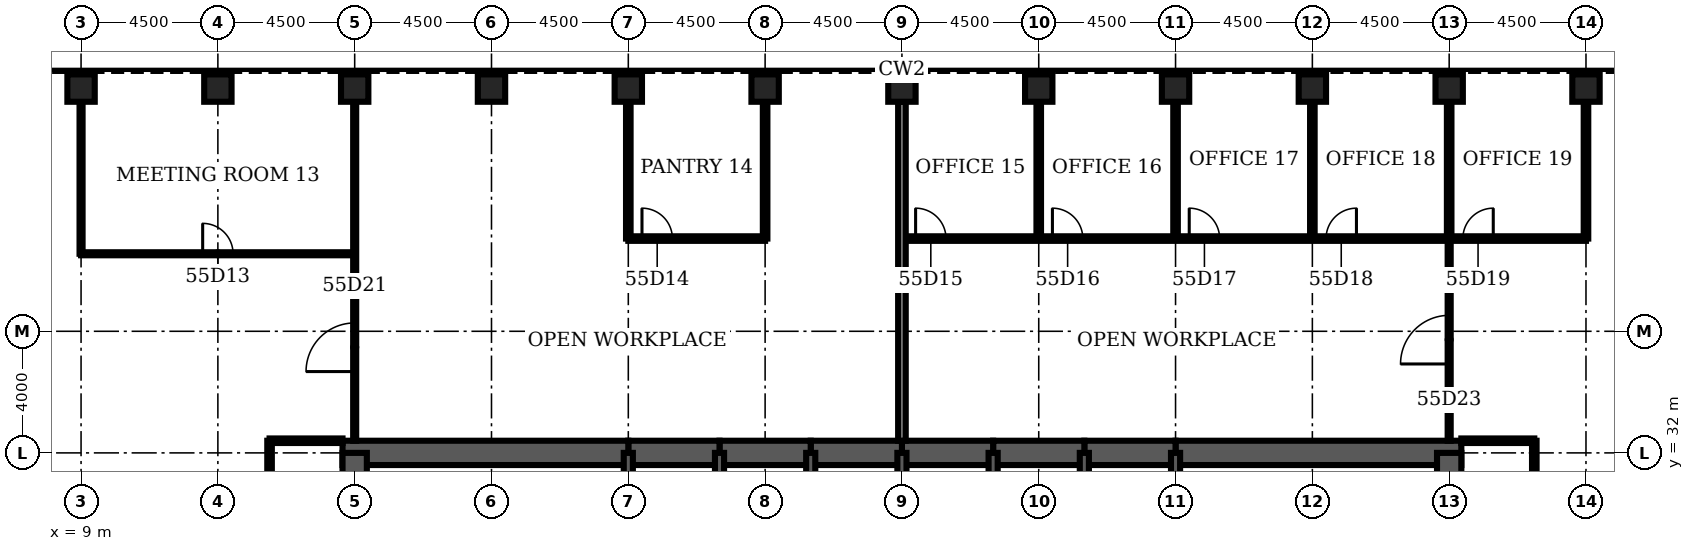
"""IFC4 building model, lengths in metres.
Left out: names, types, materials, properties, quantities, classifications, styles, units other than length and angle.
Written with IfcOpenShell. Run it as: python <this file> out.ifc"""

import sys

from ifc_helpers import new_model, si_unit, direction, frame, frame_2d, origin, origin_2d, place, context, subcontext, project, spatial, rectangle, hollow_rectangle, extrude, element, fill, save


model = new_model("IFC4")
c1 = context("Model", 3, precision=1e-05, world=origin(), true_north=direction((0.0, 1.0)))
c2 = subcontext(c1, "Body", "Model", "MODEL_VIEW")
j1 = project(units=[si_unit("LENGTHUNIT", "METRE"), si_unit("PLANEANGLEUNIT", "RADIAN")], contexts=[c1])
p1 = place(None, origin())
s1 = spatial("IfcSite", under=j1, at=p1, CompositionType="ELEMENT")
p2 = place(p1, origin())
s2 = spatial("IfcBuilding", under=s1, at=p2, CompositionType="ELEMENT")
p3 = place(p2, frame((0.0, 0.0, 244.6)))
s3 = spatial("IfcBuildingStorey", under=s2, at=p3, CompositionType="ELEMENT", Elevation=244.6)
for number, where, z_axis, x_axis in (
    (1, (58.5, 44.0, 0.0), (0.0, 0.0, 1.0), (0.0, 1.0, 0.0)),
    (2, (54.0, 44.0, 0.0), (0.0, 0.0, 1.0), (0.0, 1.0, 0.0)),
    (3, (49.5, 44.0, 0.0), (0.0, 0.0, 1.0), (0.0, 1.0, 0.0)),
    (4, (45.0, 44.0, 0.0), (0.0, 0.0, 1.0), (0.0, 1.0, 0.0)),
    (5, (40.5, 44.0, 0.0), (0.0, 0.0, 1.0), (0.0, 1.0, 0.0)),
    (6, (36.0, 44.0, 0.0), (0.0, 0.0, 1.0), (0.0, 1.0, 0.0)),
    (7, (31.5, 44.0, 0.0), (0.0, 0.0, 1.0), (0.0, 1.0, 0.0)),
    (8, (27.0, 44.0, 0.0), (0.0, 0.0, 1.0), (0.0, 1.0, 0.0)),
    (9, (22.5, 44.0, 0.0), (0.0, 0.0, 1.0), (0.0, 1.0, 0.0)),
    (10, (18.0, 44.0, 0.0), (0.0, 0.0, 1.0), (0.0, 1.0, 0.0)),
    (11, (13.5, 44.0, 0.0), (0.0, 0.0, 1.0), (0.0, 1.0, 0.0)),
    (12, (9.0, 44.0, 0.0), (0.0, 0.0, 1.0), (0.0, 1.0, 0.0)),
):
    element("IfcColumn", number, at=place(p3, frame(where, z_axis=z_axis, x_axis=x_axis)), inside=s3, PredefinedType="COLUMN", context=c2, shape_type="SweptSolid", body=[
        extrude(hollow_rectangle(XDim=0.9, YDim=0.9, WallThickness=0.08, at=origin_2d()), origin(), (0.0, 0.0, 1.0), 4.2),
    ])
p4 = place(p3, frame((54.4, 32.0, 0.0), z_axis=(0.0, 0.0, 1.0), x_axis=(-1.0, 0.0, 0.0)))
e13 = element("IfcWall", 13, at=p4, inside=s3, PredefinedType="SHEAR", context=c2, shape_type="SweptSolid", body=[
    extrude(rectangle(XDim=9.4, YDim=0.8, at=frame_2d((4.7, 0.0))), origin(), (0.0, 0.0, 1.0), 4.2),
])
for number, where, z_axis, x_axis in (
    (14, (45.0, 32.0, 0.0), (0.0, 0.0, 1.0), (-1.0, 0.0, 0.0)),
    (15, (42.0, 32.0, 0.0), (0.0, 0.0, 1.0), (-1.0, 0.0, 0.0)),
    (16, (39.0, 32.0, 0.0), (0.0, 0.0, 1.0), (-1.0, 0.0, 0.0)),
    (17, (36.0, 32.0, 0.0), (0.0, 0.0, 1.0), (-1.0, 0.0, 0.0)),
    (18, (33.0, 32.0, 0.0), (0.0, 0.0, 1.0), (-1.0, 0.0, 0.0)),
    (19, (30.0, 32.0, 0.0), (0.0, 0.0, 1.0), (-1.0, 0.0, 0.0)),
):
    element("IfcWall", number, at=place(p3, frame(where, z_axis=z_axis, x_axis=x_axis)), inside=s3, PredefinedType="SHEAR", context=c2, shape_type="SweptSolid", body=[
        extrude(rectangle(XDim=3.0, YDim=0.8, at=frame_2d((1.5, 0.0))), origin(), (0.0, 0.0, 1.0), 4.2),
    ])
p5 = place(p3, frame((27.0, 32.0, 0.0), z_axis=(0.0, 0.0, 1.0), x_axis=(-1.0, 0.0, 0.0)))
e20 = element("IfcWall", 20, at=p5, inside=s3, PredefinedType="SHEAR", context=c2, shape_type="SweptSolid", body=[
    extrude(rectangle(XDim=9.4, YDim=0.8, at=frame_2d((4.7, 0.0))), origin(), (0.0, 0.0, 1.0), 4.2),
])
for number, where, z_axis, x_axis in (
    (21, (18.0, 32.0, 0.0), (0.0, 0.0, 1.0), (0.0, -1.0, 0.0)),
    (22, (54.0, 28.8, 0.0), (0.0, 0.0, 1.0), (0.0, 1.0, 0.0)),
):
    element("IfcWall", number, at=place(p3, frame(where, z_axis=z_axis, x_axis=x_axis)), inside=s3, PredefinedType="SHEAR", context=c2, shape_type="SweptSolid", body=[
        extrude(rectangle(XDim=3.2, YDim=0.8, at=frame_2d((1.6, 0.0))), origin(), (0.0, 0.0, 1.0), 4.2),
    ])
for number, where, z_axis, x_axis in (
    (23, (27.0, 28.8, 0.0), (0.0, 0.0, 1.0), (0.0, 1.0, 0.0)),
    (24, (30.0, 28.8, 0.0), (0.0, 0.0, 1.0), (0.0, 1.0, 0.0)),
    (25, (33.0, 28.8, 0.0), (0.0, 0.0, 1.0), (0.0, 1.0, 0.0)),
    (26, (36.0, 28.8, 0.0), (0.0, 0.0, 1.0), (0.0, 1.0, 0.0)),
    (27, (39.0, 28.8, 0.0), (0.0, 0.0, 1.0), (0.0, 1.0, 0.0)),
    (28, (42.0, 28.8, 0.0), (0.0, 0.0, 1.0), (0.0, 1.0, 0.0)),
    (29, (45.0, 28.8, 0.0), (0.0, 0.0, 1.0), (0.0, 1.0, 0.0)),
):
    element("IfcWall", number, at=place(p3, frame(where, z_axis=z_axis, x_axis=x_axis)), inside=s3, PredefinedType="SOLIDWALL", context=c2, shape_type="SweptSolid", body=[
        extrude(rectangle(XDim=3.2, YDim=0.3, at=frame_2d((1.6, 0.0))), origin(), (0.0, 0.0, 1.0), 4.2),
    ])
for number, where, z_axis, x_axis in (
    (30, (15.2, 32.4, 0.0), (0.0, 0.0, 1.0), (1.0, 0.0, 0.0)),
    (31, (54.4, 32.4, 0.0), (0.0, 0.0, 1.0), (1.0, 0.0, 0.0)),
):
    element("IfcWall", number, at=place(p3, frame(where, z_axis=z_axis, x_axis=x_axis)), inside=s3, PredefinedType="PARTITIONING", context=c2, shape_type="SweptSolid", body=[
        extrude(rectangle(XDim=2.4, YDim=0.15, at=frame_2d((1.2, 0.0))), origin(), (0.0, 0.0, 1.0), 3.0),
    ])
p6 = place(p3, frame((9.0, 38.55, 0.0), z_axis=(0.0, 0.0, 1.0), x_axis=(1.0, 0.0, 0.0)))
e32 = element("IfcWall", 32, at=p6, inside=s3, PredefinedType="PARTITIONING", context=c2, shape_type="SweptSolid", body=[
    extrude(rectangle(XDim=9.0, YDim=0.1, at=frame_2d((4.5, 0.0))), origin(), (0.0, 0.0, 1.0), 3.0),
])
p7 = place(p6, frame((4.0, 0.0, 0.0)))
e33 = element("IfcOpeningElement", 33, at=p7, cuts=e32, PredefinedType="OPENING", context=c2, shape_type="SweptSolid", body=[
    extrude(rectangle(XDim=1.0, YDim=2.1, at=frame_2d((0.5, 1.05))), frame((0.0, 0.06, 0.0), z_axis=(0.0, -1.0, 0.0), x_axis=(1.0, 0.0, 0.0)), (0.0, 0.0, 1.0), 0.12),
])
p8 = place(p3, frame((27.0, 39.05, 0.0), z_axis=(0.0, 0.0, 1.0), x_axis=(1.0, 0.0, 0.0)))
e34 = element("IfcWall", 34, at=p8, inside=s3, PredefinedType="PARTITIONING", context=c2, shape_type="SweptSolid", body=[
    extrude(rectangle(XDim=4.5, YDim=0.15, at=frame_2d((2.25, 0.0))), origin(), (0.0, 0.0, 1.0), 3.0),
])
p9 = place(p8, frame((0.45, 0.0, 0.0)))
e35 = element("IfcOpeningElement", 35, at=p9, cuts=e34, PredefinedType="OPENING", context=c2, shape_type="SweptSolid", body=[
    extrude(rectangle(XDim=1.0, YDim=2.1, at=frame_2d((0.5, 1.05))), frame((0.0, 0.085, 0.0), z_axis=(0.0, -1.0, 0.0), x_axis=(1.0, 0.0, 0.0)), (0.0, 0.0, 1.0), 0.17),
])
p10 = place(p3, frame((36.0, 39.05, 0.0), z_axis=(0.0, 0.0, 1.0), x_axis=(1.0, 0.0, 0.0)))
e36 = element("IfcWall", 36, at=p10, inside=s3, PredefinedType="PARTITIONING", context=c2, shape_type="SweptSolid", body=[
    extrude(rectangle(XDim=22.5, YDim=0.15, at=frame_2d((11.25, 0.0))), origin(), (0.0, 0.0, 1.0), 3.0),
])
p11 = place(p10, frame((0.45, 0.0, 0.0)))
e37 = element("IfcOpeningElement", 37, at=p11, cuts=e36, PredefinedType="OPENING", context=c2, shape_type="SweptSolid", body=[
    extrude(rectangle(XDim=1.0, YDim=2.1, at=frame_2d((0.5, 1.05))), frame((0.0, 0.085, 0.0), z_axis=(0.0, -1.0, 0.0), x_axis=(1.0, 0.0, 0.0)), (0.0, 0.0, 1.0), 0.17),
])
p12 = place(p10, frame((4.95, 0.0, 0.0)))
e38 = element("IfcOpeningElement", 38, at=p12, cuts=e36, PredefinedType="OPENING", context=c2, shape_type="SweptSolid", body=[
    extrude(rectangle(XDim=1.0, YDim=2.1, at=frame_2d((0.5, 1.05))), frame((0.0, 0.085, 0.0), z_axis=(0.0, -1.0, 0.0), x_axis=(1.0, 0.0, 0.0)), (0.0, 0.0, 1.0), 0.17),
])
p13 = place(p10, frame((9.45, 0.0, 0.0)))
e39 = element("IfcOpeningElement", 39, at=p13, cuts=e36, PredefinedType="OPENING", context=c2, shape_type="SweptSolid", body=[
    extrude(rectangle(XDim=1.0, YDim=2.1, at=frame_2d((0.5, 1.05))), frame((0.0, 0.085, 0.0), z_axis=(0.0, -1.0, 0.0), x_axis=(1.0, 0.0, 0.0)), (0.0, 0.0, 1.0), 0.17),
])
p14 = place(p10, frame((13.95, 0.0, 0.0)))
e40 = element("IfcOpeningElement", 40, at=p14, cuts=e36, PredefinedType="OPENING", context=c2, shape_type="SweptSolid", body=[
    extrude(rectangle(XDim=1.0, YDim=2.1, at=frame_2d((0.5, 1.05))), frame((0.0, 0.085, 0.0), z_axis=(0.0, -1.0, 0.0), x_axis=(1.0, 0.0, 0.0)), (0.0, 0.0, 1.0), 0.17),
])
p15 = place(p10, frame((18.45, 0.0, 0.0)))
e41 = element("IfcOpeningElement", 41, at=p15, cuts=e36, PredefinedType="OPENING", context=c2, shape_type="SweptSolid", body=[
    extrude(rectangle(XDim=1.0, YDim=2.1, at=frame_2d((0.5, 1.05))), frame((0.0, 0.085, 0.0), z_axis=(0.0, -1.0, 0.0), x_axis=(1.0, 0.0, 0.0)), (0.0, 0.0, 1.0), 0.17),
])
p16 = place(p3, frame((9.0, 38.55, 0.0), z_axis=(0.0, 0.0, 1.0), x_axis=(0.0, 1.0, 0.0)))
e42 = element("IfcWall", 42, at=p16, inside=s3, PredefinedType="PARTITIONING", context=c2, shape_type="SweptSolid", body=[
    extrude(rectangle(XDim=5.0, YDim=0.1, at=frame_2d((2.5, 0.0))), origin(), (0.0, 0.0, 1.0), 3.0),
])
p17 = place(p3, frame((15.2, 13.8, 0.0), z_axis=(0.0, 0.0, 1.0), x_axis=(0.0, 1.0, 0.0)))
e43 = element("IfcWall", 43, at=p17, inside=s3, PredefinedType="PARTITIONING", context=c2, shape_type="SweptSolid", body=[
    extrude(rectangle(XDim=18.6, YDim=0.15, at=frame_2d((9.3, 0.0))), origin(), (0.0, 0.0, 1.0), 3.0),
])
p18 = place(p17, frame((8.7, 0.0, 0.0)))
e44 = element("IfcOpeningElement", 44, at=p18, cuts=e43, PredefinedType="OPENING", context=c2, shape_type="SweptSolid", body=[
    extrude(rectangle(XDim=1.2, YDim=2.1, at=frame_2d((0.6, 1.05))), frame((0.0, 0.085, 0.0), z_axis=(0.0, -1.0, 0.0), x_axis=(1.0, 0.0, 0.0)), (0.0, 0.0, 1.0), 0.17),
])
p19 = place(p3, frame((18.0, 32.4, 0.0), z_axis=(0.0, 0.0, 1.0), x_axis=(0.0, 1.0, 0.0)))
e45 = element("IfcWall", 45, at=p19, inside=s3, PredefinedType="PARTITIONING", context=c2, shape_type="SweptSolid", body=[
    extrude(rectangle(XDim=11.15, YDim=0.1, at=frame_2d((5.575, 0.0))), origin(), (0.0, 0.0, 1.0), 3.0),
])
p20 = place(p19, frame((2.275, 0.0, 0.0)))
e46 = element("IfcOpeningElement", 46, at=p20, cuts=e45, PredefinedType="OPENING", context=c2, shape_type="SweptSolid", body=[
    extrude(rectangle(XDim=1.6, YDim=2.1, at=frame_2d((0.8, 1.05))), frame((0.0, 0.06, 0.0), z_axis=(0.0, -1.0, 0.0), x_axis=(1.0, 0.0, 0.0)), (0.0, 0.0, 1.0), 0.12),
])
for number, where, z_axis, x_axis in (
    (47, (27.0, 39.05, 0.0), (0.0, 0.0, 1.0), (0.0, 1.0, 0.0)),
    (48, (31.5, 39.05, 0.0), (0.0, 0.0, 1.0), (0.0, 1.0, 0.0)),
):
    element("IfcWall", number, at=place(p3, frame(where, z_axis=z_axis, x_axis=x_axis)), inside=s3, PredefinedType="PARTITIONING", context=c2, shape_type="SweptSolid", body=[
        extrude(rectangle(XDim=4.5, YDim=0.15, at=frame_2d((2.25, 0.0))), origin(), (0.0, 0.0, 1.0), 3.0),
    ])
p21 = place(p3, frame((36.0, 32.4, 0.0), z_axis=(0.0, 0.0, 1.0), x_axis=(0.0, 1.0, 0.0)))
e49 = element("IfcWall", 49, at=p21, inside=s3, PredefinedType="PARTITIONING", context=c2, shape_type="SweptSolid", body=[
    extrude(rectangle(XDim=11.15, YDim=0.25, at=frame_2d((5.575, 0.0))), origin(), (0.0, 0.0, 1.0), 3.0),
])
for number, where, z_axis, x_axis in (
    (50, (40.5, 39.05, 0.0), (0.0, 0.0, 1.0), (0.0, 1.0, 0.0)),
    (51, (45.0, 39.05, 0.0), (0.0, 0.0, 1.0), (0.0, 1.0, 0.0)),
    (52, (49.5, 39.05, 0.0), (0.0, 0.0, 1.0), (0.0, 1.0, 0.0)),
):
    element("IfcWall", number, at=place(p3, frame(where, z_axis=z_axis, x_axis=x_axis)), inside=s3, PredefinedType="PARTITIONING", context=c2, shape_type="SweptSolid", body=[
        extrude(rectangle(XDim=4.5, YDim=0.15, at=frame_2d((2.25, 0.0))), origin(), (0.0, 0.0, 1.0), 3.0),
    ])
p22 = place(p3, frame((54.0, 32.4, 0.0), z_axis=(0.0, 0.0, 1.0), x_axis=(0.0, 1.0, 0.0)))
e53 = element("IfcWall", 53, at=p22, inside=s3, PredefinedType="PARTITIONING", context=c2, shape_type="SweptSolid", body=[
    extrude(rectangle(XDim=6.65, YDim=0.1, at=frame_2d((3.325, 0.0))), origin(), (0.0, 0.0, 1.0), 3.0),
])
p23 = place(p22, frame((2.525, 0.0, 0.0)))
e54 = element("IfcOpeningElement", 54, at=p23, cuts=e53, PredefinedType="OPENING", context=c2, shape_type="SweptSolid", body=[
    extrude(rectangle(XDim=1.6, YDim=2.1, at=frame_2d((0.8, 1.05))), frame((0.0, 0.06, 0.0), z_axis=(0.0, -1.0, 0.0), x_axis=(1.0, 0.0, 0.0)), (0.0, 0.0, 1.0), 0.12),
])
p24 = place(p3, frame((54.0, 39.05, 0.0), z_axis=(0.0, 0.0, 1.0), x_axis=(0.0, 1.0, 0.0)))
e55 = element("IfcWall", 55, at=p24, inside=s3, PredefinedType="PARTITIONING", context=c2, shape_type="SweptSolid", body=[
    extrude(rectangle(XDim=4.5, YDim=0.15, at=frame_2d((2.25, 0.0))), origin(), (0.0, 0.0, 1.0), 3.0),
])
p25 = place(p3, frame((56.8, 13.8, 0.0), z_axis=(0.0, 0.0, 1.0), x_axis=(0.0, 1.0, 0.0)))
e56 = element("IfcWall", 56, at=p25, inside=s3, PredefinedType="PARTITIONING", context=c2, shape_type="SweptSolid", body=[
    extrude(rectangle(XDim=18.6, YDim=0.15, at=frame_2d((9.3, 0.0))), origin(), (0.0, 0.0, 1.0), 3.0),
])
p26 = place(p25, frame((8.7, 0.0, 0.0)))
e57 = element("IfcOpeningElement", 57, at=p26, cuts=e56, PredefinedType="OPENING", context=c2, shape_type="SweptSolid", body=[
    extrude(rectangle(XDim=1.2, YDim=2.1, at=frame_2d((0.6, 1.05))), frame((0.0, 0.085, 0.0), z_axis=(0.0, -1.0, 0.0), x_axis=(1.0, 0.0, 0.0)), (0.0, 0.0, 1.0), 0.17),
])
p27 = place(p3, frame((58.5, 39.05, 0.0), z_axis=(0.0, 0.0, 1.0), x_axis=(0.0, 1.0, 0.0)))
e58 = element("IfcWall", 58, at=p27, inside=s3, PredefinedType="PARTITIONING", context=c2, shape_type="SweptSolid", body=[
    extrude(rectangle(XDim=4.5, YDim=0.15, at=frame_2d((2.25, 0.0))), origin(), (0.0, 0.0, 1.0), 3.0),
])
p28 = place(p7, origin())
e59 = element("IfcDoor", 59, at=p28, inside=s3, OperationType="SINGLE_SWING_LEFT", PredefinedType="DOOR", context=c2, shape_type="SweptSolid", body=[
    extrude(rectangle(XDim=1.0, YDim=2.1, at=frame_2d((0.5, 1.05))), frame((0.0, 0.025, 0.0), z_axis=(0.0, -1.0, 0.0), x_axis=(1.0, 0.0, 0.0)), (0.0, 0.0, 1.0), 0.05),
])
fill(e33, e59)
p29 = place(p9, origin())
e60 = element("IfcDoor", 60, at=p29, inside=s3, OperationType="SINGLE_SWING_LEFT", PredefinedType="DOOR", context=c2, shape_type="SweptSolid", body=[
    extrude(rectangle(XDim=1.0, YDim=2.1, at=frame_2d((0.5, 1.05))), frame((0.0, 0.025, 0.0), z_axis=(0.0, -1.0, 0.0), x_axis=(1.0, 0.0, 0.0)), (0.0, 0.0, 1.0), 0.05),
])
fill(e35, e60)
p30 = place(p11, origin())
e61 = element("IfcDoor", 61, at=p30, inside=s3, OperationType="SINGLE_SWING_LEFT", PredefinedType="DOOR", context=c2, shape_type="SweptSolid", body=[
    extrude(rectangle(XDim=1.0, YDim=2.1, at=frame_2d((0.5, 1.05))), frame((0.0, 0.025, 0.0), z_axis=(0.0, -1.0, 0.0), x_axis=(1.0, 0.0, 0.0)), (0.0, 0.0, 1.0), 0.05),
])
fill(e37, e61)
p31 = place(p12, origin())
e62 = element("IfcDoor", 62, at=p31, inside=s3, OperationType="SINGLE_SWING_LEFT", PredefinedType="DOOR", context=c2, shape_type="SweptSolid", body=[
    extrude(rectangle(XDim=1.0, YDim=2.1, at=frame_2d((0.5, 1.05))), frame((0.0, 0.025, 0.0), z_axis=(0.0, -1.0, 0.0), x_axis=(1.0, 0.0, 0.0)), (0.0, 0.0, 1.0), 0.05),
])
fill(e38, e62)
p32 = place(p13, origin())
e63 = element("IfcDoor", 63, at=p32, inside=s3, OperationType="SINGLE_SWING_LEFT", PredefinedType="DOOR", context=c2, shape_type="SweptSolid", body=[
    extrude(rectangle(XDim=1.0, YDim=2.1, at=frame_2d((0.5, 1.05))), frame((0.0, 0.025, 0.0), z_axis=(0.0, -1.0, 0.0), x_axis=(1.0, 0.0, 0.0)), (0.0, 0.0, 1.0), 0.05),
])
fill(e39, e63)
p33 = place(p14, origin())
e64 = element("IfcDoor", 64, at=p33, inside=s3, OperationType="SINGLE_SWING_RIGHT", PredefinedType="DOOR", context=c2, shape_type="SweptSolid", body=[
    extrude(rectangle(XDim=1.0, YDim=2.1, at=frame_2d((0.5, 1.05))), frame((0.0, 0.025, 0.0), z_axis=(0.0, -1.0, 0.0), x_axis=(1.0, 0.0, 0.0)), (0.0, 0.0, 1.0), 0.05),
])
fill(e40, e64)
p34 = place(p15, origin())
e65 = element("IfcDoor", 65, at=p34, inside=s3, OperationType="SINGLE_SWING_RIGHT", PredefinedType="DOOR", context=c2, shape_type="SweptSolid", body=[
    extrude(rectangle(XDim=1.0, YDim=2.1, at=frame_2d((0.5, 1.05))), frame((0.0, 0.025, 0.0), z_axis=(0.0, -1.0, 0.0), x_axis=(1.0, 0.0, 0.0)), (0.0, 0.0, 1.0), 0.05),
])
fill(e41, e65)
p35 = place(p20, origin())
e66 = element("IfcDoor", 66, at=p35, inside=s3, OperationType="SINGLE_SWING_LEFT", PredefinedType="DOOR", context=c2, shape_type="SweptSolid", body=[
    extrude(rectangle(XDim=1.6, YDim=2.1, at=frame_2d((0.8, 1.05))), frame((0.0, 0.025, 0.0), z_axis=(0.0, -1.0, 0.0), x_axis=(1.0, 0.0, 0.0)), (0.0, 0.0, 1.0), 0.05),
])
fill(e46, e66)
p36 = place(p23, origin())
e67 = element("IfcDoor", 67, at=p36, inside=s3, OperationType="SINGLE_SWING_LEFT", PredefinedType="DOOR", context=c2, shape_type="SweptSolid", body=[
    extrude(rectangle(XDim=1.6, YDim=2.1, at=frame_2d((0.8, 1.05))), frame((0.0, 0.025, 0.0), z_axis=(0.0, -1.0, 0.0), x_axis=(1.0, 0.0, 0.0)), (0.0, 0.0, 1.0), 0.05),
])
fill(e54, e67)
save(model, sys.argv[1])
